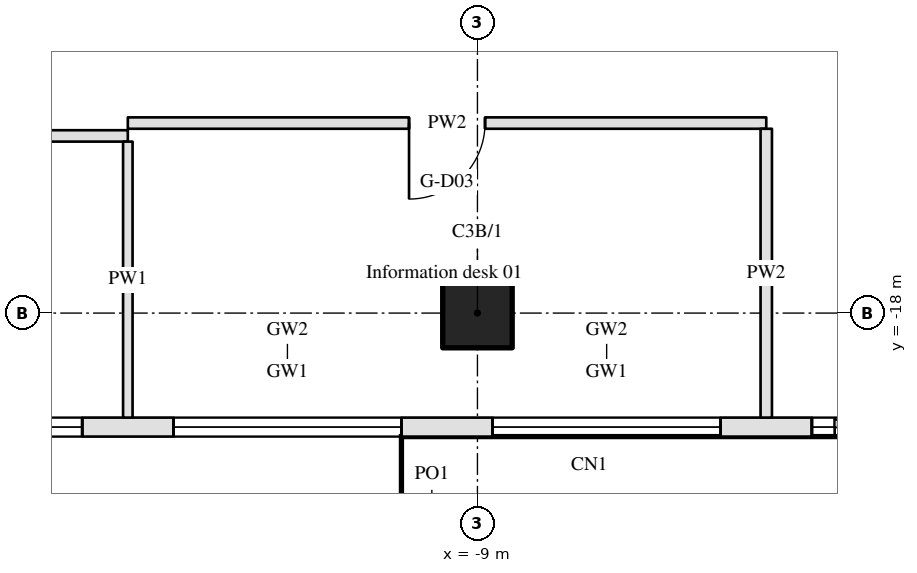
"""IFC4 building model, lengths in metres.
Left out: names, types, materials, properties, quantities, classifications, styles, units other than length and angle.
Written with IfcOpenShell. Run it as: python <this file> out.ifc"""

import sys

from ifc_helpers import new_model, si_unit, direction, frame, frame_2d, origin, origin_2d, place, context, subcontext, project, spatial, rectangle, hollow_circle, extrude, element, fill, save


model = new_model("IFC4")
c1 = context("Model", 3, precision=1e-05, world=origin(), true_north=direction((0.0, 1.0)))
c2 = subcontext(c1, "Body", "Model", "MODEL_VIEW")
j1 = project(units=[si_unit("LENGTHUNIT", "METRE"), si_unit("PLANEANGLEUNIT", "RADIAN")], contexts=[c1])
p1 = place(None, origin())
s1 = spatial("IfcSite", under=j1, at=p1, CompositionType="ELEMENT")
p2 = place(p1, origin())
s2 = spatial("IfcBuilding", under=s1, at=p2, CompositionType="ELEMENT")
p3 = place(p2, origin())
s3 = spatial("IfcBuildingStorey", under=s2, at=p3, CompositionType="ELEMENT", Elevation=0.0)
p4 = place(p3, frame((-9.0, -18.0, 0.0), z_axis=(0.0, 0.0, 1.0), x_axis=(1.0, 0.0, 0.0)))
e1 = element("IfcColumn", 1, at=p4, inside=s3, PredefinedType="COLUMN", context=c2, shape_type="SweptSolid", body=[
    extrude(hollow_circle(Radius=0.457, WallThickness=0.05, at=origin_2d()), origin(), (0.0, 0.0, 1.0), 10.8),
])
p5 = place(p3, frame((-22.125, -19.5, 0.0), z_axis=(0.0, 0.0, 1.0), x_axis=(1.0, 0.0, 0.0)))
e2 = element("IfcWall", 2, at=p5, inside=s3, PredefinedType="STANDARD", context=c2, shape_type="SweptSolid", body=[
    extrude(rectangle(XDim=42.25, YDim=0.25, at=frame_2d((21.125, 0.0))), origin(), (0.0, 0.0, 1.0), 10.0),
])
p6 = place(p5, frame((0.725, 0.0, 0.15)))
e3 = element("IfcOpeningElement", 3, at=p6, cuts=e2, PredefinedType="OPENING", context=c2, shape_type="SweptSolid", body=[
    extrude(rectangle(XDim=3.0, YDim=4.2, at=frame_2d((1.5, 2.1))), frame((0.0, 0.135, 0.0), z_axis=(0.0, -1.0, 0.0), x_axis=(1.0, 0.0, 0.0)), (0.0, 0.0, 1.0), 0.27),
])
p7 = place(p5, frame((0.725, 0.0, 4.95)))
e4 = element("IfcOpeningElement", 4, at=p7, cuts=e2, PredefinedType="OPENING", context=c2, shape_type="SweptSolid", body=[
    extrude(rectangle(XDim=3.0, YDim=4.4, at=frame_2d((1.5, 2.2))), frame((0.0, 0.135, 0.0), z_axis=(0.0, -1.0, 0.0), x_axis=(1.0, 0.0, 0.0)), (0.0, 0.0, 1.0), 0.27),
])
p8 = place(p5, frame((4.925, 0.0, 0.15)))
e5 = element("IfcOpeningElement", 5, at=p8, cuts=e2, PredefinedType="OPENING", context=c2, shape_type="SweptSolid", body=[
    extrude(rectangle(XDim=3.0, YDim=4.2, at=frame_2d((1.5, 2.1))), frame((0.0, 0.135, 0.0), z_axis=(0.0, -1.0, 0.0), x_axis=(1.0, 0.0, 0.0)), (0.0, 0.0, 1.0), 0.27),
])
p9 = place(p5, frame((4.925, 0.0, 4.95)))
e6 = element("IfcOpeningElement", 6, at=p9, cuts=e2, PredefinedType="OPENING", context=c2, shape_type="SweptSolid", body=[
    extrude(rectangle(XDim=3.0, YDim=4.4, at=frame_2d((1.5, 2.2))), frame((0.0, 0.135, 0.0), z_axis=(0.0, -1.0, 0.0), x_axis=(1.0, 0.0, 0.0)), (0.0, 0.0, 1.0), 0.27),
])
p10 = place(p5, frame((9.125, 0.0, 0.15)))
e7 = element("IfcOpeningElement", 7, at=p10, cuts=e2, PredefinedType="OPENING", context=c2, shape_type="SweptSolid", body=[
    extrude(rectangle(XDim=3.0, YDim=4.2, at=frame_2d((1.5, 2.1))), frame((0.0, 0.135, 0.0), z_axis=(0.0, -1.0, 0.0), x_axis=(1.0, 0.0, 0.0)), (0.0, 0.0, 1.0), 0.27),
])
p11 = place(p5, frame((9.125, 0.0, 4.95)))
e8 = element("IfcOpeningElement", 8, at=p11, cuts=e2, PredefinedType="OPENING", context=c2, shape_type="SweptSolid", body=[
    extrude(rectangle(XDim=3.0, YDim=4.4, at=frame_2d((1.5, 2.2))), frame((0.0, 0.135, 0.0), z_axis=(0.0, -1.0, 0.0), x_axis=(1.0, 0.0, 0.0)), (0.0, 0.0, 1.0), 0.27),
])
p12 = place(p5, frame((13.325, 0.0, 0.15)))
e9 = element("IfcOpeningElement", 9, at=p12, cuts=e2, PredefinedType="OPENING", context=c2, shape_type="SweptSolid", body=[
    extrude(rectangle(XDim=3.0, YDim=4.2, at=frame_2d((1.5, 2.1))), frame((0.0, 0.135, 0.0), z_axis=(0.0, -1.0, 0.0), x_axis=(1.0, 0.0, 0.0)), (0.0, 0.0, 1.0), 0.27),
])
p13 = place(p5, frame((13.325, 0.0, 4.95)))
e10 = element("IfcOpeningElement", 10, at=p13, cuts=e2, PredefinedType="OPENING", context=c2, shape_type="SweptSolid", body=[
    extrude(rectangle(XDim=3.0, YDim=4.4, at=frame_2d((1.5, 2.2))), frame((0.0, 0.135, 0.0), z_axis=(0.0, -1.0, 0.0), x_axis=(1.0, 0.0, 0.0)), (0.0, 0.0, 1.0), 0.27),
])
p14 = place(p5, frame((17.825, 0.0, 0.0)))
e11 = element("IfcOpeningElement", 11, at=p14, cuts=e2, PredefinedType="OPENING", context=c2, shape_type="SweptSolid", body=[
    extrude(rectangle(XDim=2.4, YDim=2.6, at=frame_2d((1.2, 1.3))), frame((0.0, 0.135, 0.0), z_axis=(0.0, -1.0, 0.0), x_axis=(1.0, 0.0, 0.0)), (0.0, 0.0, 1.0), 0.27),
])
p15 = place(p5, frame((17.525, 0.0, 2.9)))
e12 = element("IfcOpeningElement", 12, at=p15, cuts=e2, PredefinedType="OPENING", context=c2, shape_type="SweptSolid", body=[
    extrude(rectangle(XDim=3.0, YDim=1.45, at=frame_2d((1.5, 0.725))), frame((0.0, 0.135, 0.0), z_axis=(0.0, -1.0, 0.0), x_axis=(1.0, 0.0, 0.0)), (0.0, 0.0, 1.0), 0.27),
])
p16 = place(p5, frame((17.525, 0.0, 4.95)))
e13 = element("IfcOpeningElement", 13, at=p16, cuts=e2, PredefinedType="OPENING", context=c2, shape_type="SweptSolid", body=[
    extrude(rectangle(XDim=3.0, YDim=4.4, at=frame_2d((1.5, 2.2))), frame((0.0, 0.135, 0.0), z_axis=(0.0, -1.0, 0.0), x_axis=(1.0, 0.0, 0.0)), (0.0, 0.0, 1.0), 0.27),
])
p17 = place(p5, frame((21.725, 0.0, 0.15)))
e14 = element("IfcOpeningElement", 14, at=p17, cuts=e2, PredefinedType="OPENING", context=c2, shape_type="SweptSolid", body=[
    extrude(rectangle(XDim=3.0, YDim=4.2, at=frame_2d((1.5, 2.1))), frame((0.0, 0.135, 0.0), z_axis=(0.0, -1.0, 0.0), x_axis=(1.0, 0.0, 0.0)), (0.0, 0.0, 1.0), 0.27),
])
p18 = place(p5, frame((21.725, 0.0, 4.95)))
e15 = element("IfcOpeningElement", 15, at=p18, cuts=e2, PredefinedType="OPENING", context=c2, shape_type="SweptSolid", body=[
    extrude(rectangle(XDim=3.0, YDim=4.4, at=frame_2d((1.5, 2.2))), frame((0.0, 0.135, 0.0), z_axis=(0.0, -1.0, 0.0), x_axis=(1.0, 0.0, 0.0)), (0.0, 0.0, 1.0), 0.27),
])
p19 = place(p5, frame((26.225, 0.0, 0.0)))
e16 = element("IfcOpeningElement", 16, at=p19, cuts=e2, PredefinedType="OPENING", context=c2, shape_type="SweptSolid", body=[
    extrude(rectangle(XDim=2.4, YDim=2.6, at=frame_2d((1.2, 1.3))), frame((0.0, 0.135, 0.0), z_axis=(0.0, -1.0, 0.0), x_axis=(1.0, 0.0, 0.0)), (0.0, 0.0, 1.0), 0.27),
])
p20 = place(p5, frame((25.925, 0.0, 2.9)))
e17 = element("IfcOpeningElement", 17, at=p20, cuts=e2, PredefinedType="OPENING", context=c2, shape_type="SweptSolid", body=[
    extrude(rectangle(XDim=3.0, YDim=1.45, at=frame_2d((1.5, 0.725))), frame((0.0, 0.135, 0.0), z_axis=(0.0, -1.0, 0.0), x_axis=(1.0, 0.0, 0.0)), (0.0, 0.0, 1.0), 0.27),
])
p21 = place(p5, frame((25.925, 0.0, 4.95)))
e18 = element("IfcOpeningElement", 18, at=p21, cuts=e2, PredefinedType="OPENING", context=c2, shape_type="SweptSolid", body=[
    extrude(rectangle(XDim=3.0, YDim=4.4, at=frame_2d((1.5, 2.2))), frame((0.0, 0.135, 0.0), z_axis=(0.0, -1.0, 0.0), x_axis=(1.0, 0.0, 0.0)), (0.0, 0.0, 1.0), 0.27),
])
p22 = place(p5, frame((30.125, 0.0, 0.15)))
e19 = element("IfcOpeningElement", 19, at=p22, cuts=e2, PredefinedType="OPENING", context=c2, shape_type="SweptSolid", body=[
    extrude(rectangle(XDim=3.0, YDim=4.2, at=frame_2d((1.5, 2.1))), frame((0.0, 0.135, 0.0), z_axis=(0.0, -1.0, 0.0), x_axis=(1.0, 0.0, 0.0)), (0.0, 0.0, 1.0), 0.27),
])
p23 = place(p5, frame((30.125, 0.0, 4.95)))
e20 = element("IfcOpeningElement", 20, at=p23, cuts=e2, PredefinedType="OPENING", context=c2, shape_type="SweptSolid", body=[
    extrude(rectangle(XDim=3.0, YDim=4.4, at=frame_2d((1.5, 2.2))), frame((0.0, 0.135, 0.0), z_axis=(0.0, -1.0, 0.0), x_axis=(1.0, 0.0, 0.0)), (0.0, 0.0, 1.0), 0.27),
])
p24 = place(p5, frame((34.325, 0.0, 0.15)))
e21 = element("IfcOpeningElement", 21, at=p24, cuts=e2, PredefinedType="OPENING", context=c2, shape_type="SweptSolid", body=[
    extrude(rectangle(XDim=3.0, YDim=4.2, at=frame_2d((1.5, 2.1))), frame((0.0, 0.135, 0.0), z_axis=(0.0, -1.0, 0.0), x_axis=(1.0, 0.0, 0.0)), (0.0, 0.0, 1.0), 0.27),
])
p25 = place(p5, frame((34.325, 0.0, 4.95)))
e22 = element("IfcOpeningElement", 22, at=p25, cuts=e2, PredefinedType="OPENING", context=c2, shape_type="SweptSolid", body=[
    extrude(rectangle(XDim=3.0, YDim=4.4, at=frame_2d((1.5, 2.2))), frame((0.0, 0.135, 0.0), z_axis=(0.0, -1.0, 0.0), x_axis=(1.0, 0.0, 0.0)), (0.0, 0.0, 1.0), 0.27),
])
p26 = place(p5, frame((38.525, 0.0, 0.15)))
e23 = element("IfcOpeningElement", 23, at=p26, cuts=e2, PredefinedType="OPENING", context=c2, shape_type="SweptSolid", body=[
    extrude(rectangle(XDim=3.0, YDim=4.2, at=frame_2d((1.5, 2.1))), frame((0.0, 0.135, 0.0), z_axis=(0.0, -1.0, 0.0), x_axis=(1.0, 0.0, 0.0)), (0.0, 0.0, 1.0), 0.27),
])
p27 = place(p5, frame((38.525, 0.0, 4.95)))
e24 = element("IfcOpeningElement", 24, at=p27, cuts=e2, PredefinedType="OPENING", context=c2, shape_type="SweptSolid", body=[
    extrude(rectangle(XDim=3.0, YDim=4.4, at=frame_2d((1.5, 2.2))), frame((0.0, 0.135, 0.0), z_axis=(0.0, -1.0, 0.0), x_axis=(1.0, 0.0, 0.0)), (0.0, 0.0, 1.0), 0.27),
])
p28 = place(p3, frame((-13.6, -15.669, 0.0), z_axis=(0.0, 0.0, 1.0), x_axis=(-1.0, 0.0, 0.0)))
e25 = element("IfcWall", 25, at=p28, inside=s3, PredefinedType="PARTITIONING", context=c2, shape_type="SweptSolid", body=[
    extrude(rectangle(XDim=4.9, YDim=0.15, at=frame_2d((2.45, 0.0))), origin(), (0.0, 0.0, 1.0), 9.86),
])
p29 = place(p28, frame((1.95, 0.0, 0.0)))
e26 = element("IfcOpeningElement", 26, at=p29, cuts=e25, PredefinedType="OPENING", context=c2, shape_type="SweptSolid", body=[
    extrude(rectangle(XDim=1.0, YDim=2.1, at=frame_2d((0.5, 1.05))), frame((0.0, 0.085, 0.0), z_axis=(0.0, -1.0, 0.0), x_axis=(1.0, 0.0, 0.0)), (0.0, 0.0, 1.0), 0.17),
])
p30 = place(p3, frame((-5.2, -15.5, 0.0), z_axis=(0.0, 0.0, 1.0), x_axis=(-1.0, 0.0, 0.0)))
e27 = element("IfcWall", 27, at=p30, inside=s3, PredefinedType="PARTITIONING", context=c2, shape_type="SweptSolid", body=[
    extrude(rectangle(XDim=8.4, YDim=0.15, at=frame_2d((4.2, 0.0))), origin(), (0.0, 0.0, 1.0), 9.86),
])
p31 = place(p30, frame((3.7, 0.0, 0.0)))
e28 = element("IfcOpeningElement", 28, at=p31, cuts=e27, PredefinedType="OPENING", context=c2, shape_type="SweptSolid", body=[
    extrude(rectangle(XDim=1.0, YDim=2.1, at=frame_2d((0.5, 1.05))), frame((0.0, 0.085, 0.0), z_axis=(0.0, -1.0, 0.0), x_axis=(1.0, 0.0, 0.0)), (0.0, 0.0, 1.0), 0.17),
])
p32 = place(p3, frame((-13.6, -19.375, 0.0), z_axis=(0.0, 0.0, 1.0), x_axis=(0.0, 1.0, 0.0)))
e29 = element("IfcWall", 29, at=p32, inside=s3, PredefinedType="PARTITIONING", context=c2, shape_type="SweptSolid", body=[
    extrude(rectangle(XDim=3.631, YDim=0.125, at=frame_2d((1.815, 0.0))), origin(), (0.0, 0.0, 1.0), 9.86),
])
p33 = place(p3, frame((-5.2, -19.375, 0.0), z_axis=(0.0, 0.0, 1.0), x_axis=(0.0, 1.0, 0.0)))
e30 = element("IfcWall", 30, at=p33, inside=s3, PredefinedType="PARTITIONING", context=c2, shape_type="SweptSolid", body=[
    extrude(rectangle(XDim=3.8, YDim=0.15, at=frame_2d((1.9, 0.0))), origin(), (0.0, 0.0, 1.0), 9.86),
])
p34 = place(p8, origin())
e31 = element("IfcWindow", 31, at=p34, inside=s3, PartitioningType="DOUBLE_PANEL_HORIZONTAL", PredefinedType="WINDOW", context=c2, shape_type="SweptSolid", body=[
    extrude(rectangle(XDim=3.0, YDim=4.2, at=frame_2d((1.5, 2.1))), frame((0.0, 0.03, 0.0), z_axis=(0.0, -1.0, 0.0), x_axis=(1.0, 0.0, 0.0)), (0.0, 0.0, 1.0), 0.06),
])
fill(e5, e31)
p35 = place(p9, origin())
e32 = element("IfcWindow", 32, at=p35, inside=s3, PartitioningType="DOUBLE_PANEL_HORIZONTAL", PredefinedType="WINDOW", context=c2, shape_type="SweptSolid", body=[
    extrude(rectangle(XDim=3.0, YDim=4.4, at=frame_2d((1.5, 2.2))), frame((0.0, 0.03, 0.0), z_axis=(0.0, -1.0, 0.0), x_axis=(1.0, 0.0, 0.0)), (0.0, 0.0, 1.0), 0.06),
])
fill(e6, e32)
p36 = place(p10, origin())
e33 = element("IfcWindow", 33, at=p36, inside=s3, PartitioningType="DOUBLE_PANEL_HORIZONTAL", PredefinedType="WINDOW", context=c2, shape_type="SweptSolid", body=[
    extrude(rectangle(XDim=3.0, YDim=4.2, at=frame_2d((1.5, 2.1))), frame((0.0, 0.03, 0.0), z_axis=(0.0, -1.0, 0.0), x_axis=(1.0, 0.0, 0.0)), (0.0, 0.0, 1.0), 0.06),
])
fill(e7, e33)
p37 = place(p11, origin())
e34 = element("IfcWindow", 34, at=p37, inside=s3, PartitioningType="DOUBLE_PANEL_HORIZONTAL", PredefinedType="WINDOW", context=c2, shape_type="SweptSolid", body=[
    extrude(rectangle(XDim=3.0, YDim=4.4, at=frame_2d((1.5, 2.2))), frame((0.0, 0.03, 0.0), z_axis=(0.0, -1.0, 0.0), x_axis=(1.0, 0.0, 0.0)), (0.0, 0.0, 1.0), 0.06),
])
fill(e8, e34)
p38 = place(p12, origin())
e35 = element("IfcWindow", 35, at=p38, inside=s3, PartitioningType="DOUBLE_PANEL_HORIZONTAL", PredefinedType="WINDOW", context=c2, shape_type="SweptSolid", body=[
    extrude(rectangle(XDim=3.0, YDim=4.2, at=frame_2d((1.5, 2.1))), frame((0.0, 0.03, 0.0), z_axis=(0.0, -1.0, 0.0), x_axis=(1.0, 0.0, 0.0)), (0.0, 0.0, 1.0), 0.06),
])
fill(e9, e35)
p39 = place(p13, origin())
e36 = element("IfcWindow", 36, at=p39, inside=s3, PartitioningType="DOUBLE_PANEL_HORIZONTAL", PredefinedType="WINDOW", context=c2, shape_type="SweptSolid", body=[
    extrude(rectangle(XDim=3.0, YDim=4.4, at=frame_2d((1.5, 2.2))), frame((0.0, 0.03, 0.0), z_axis=(0.0, -1.0, 0.0), x_axis=(1.0, 0.0, 0.0)), (0.0, 0.0, 1.0), 0.06),
])
fill(e10, e36)
p40 = place(p14, origin())
e37 = element("IfcDoor", 37, at=p40, inside=s3, OperationType="DOUBLE_DOOR_SLIDING", PredefinedType="DOOR", context=c2, shape_type="SweptSolid", body=[
    extrude(rectangle(XDim=2.4, YDim=2.6, at=frame_2d((1.2, 1.3))), frame((0.0, 0.025, 0.0), z_axis=(0.0, -1.0, 0.0), x_axis=(1.0, 0.0, 0.0)), (0.0, 0.0, 1.0), 0.05),
])
fill(e11, e37)
p41 = place(p15, origin())
e38 = element("IfcWindow", 38, at=p41, inside=s3, PartitioningType="SINGLE_PANEL", PredefinedType="WINDOW", context=c2, shape_type="SweptSolid", body=[
    extrude(rectangle(XDim=3.0, YDim=1.45, at=frame_2d((1.5, 0.725))), frame((0.0, 0.03, 0.0), z_axis=(0.0, -1.0, 0.0), x_axis=(1.0, 0.0, 0.0)), (0.0, 0.0, 1.0), 0.06),
])
fill(e12, e38)
p42 = place(p16, origin())
e39 = element("IfcWindow", 39, at=p42, inside=s3, PartitioningType="DOUBLE_PANEL_HORIZONTAL", PredefinedType="WINDOW", context=c2, shape_type="SweptSolid", body=[
    extrude(rectangle(XDim=3.0, YDim=4.4, at=frame_2d((1.5, 2.2))), frame((0.0, 0.03, 0.0), z_axis=(0.0, -1.0, 0.0), x_axis=(1.0, 0.0, 0.0)), (0.0, 0.0, 1.0), 0.06),
])
fill(e13, e39)
p43 = place(p31, origin())
e40 = element("IfcDoor", 40, at=p43, inside=s3, OperationType="SINGLE_SWING_RIGHT", PredefinedType="DOOR", context=c2, shape_type="SweptSolid", body=[
    extrude(rectangle(XDim=1.0, YDim=2.1, at=frame_2d((0.5, 1.05))), frame((0.0, 0.025, 0.0), z_axis=(0.0, -1.0, 0.0), x_axis=(1.0, 0.0, 0.0)), (0.0, 0.0, 1.0), 0.05),
])
fill(e28, e40)
save(model, sys.argv[1])
